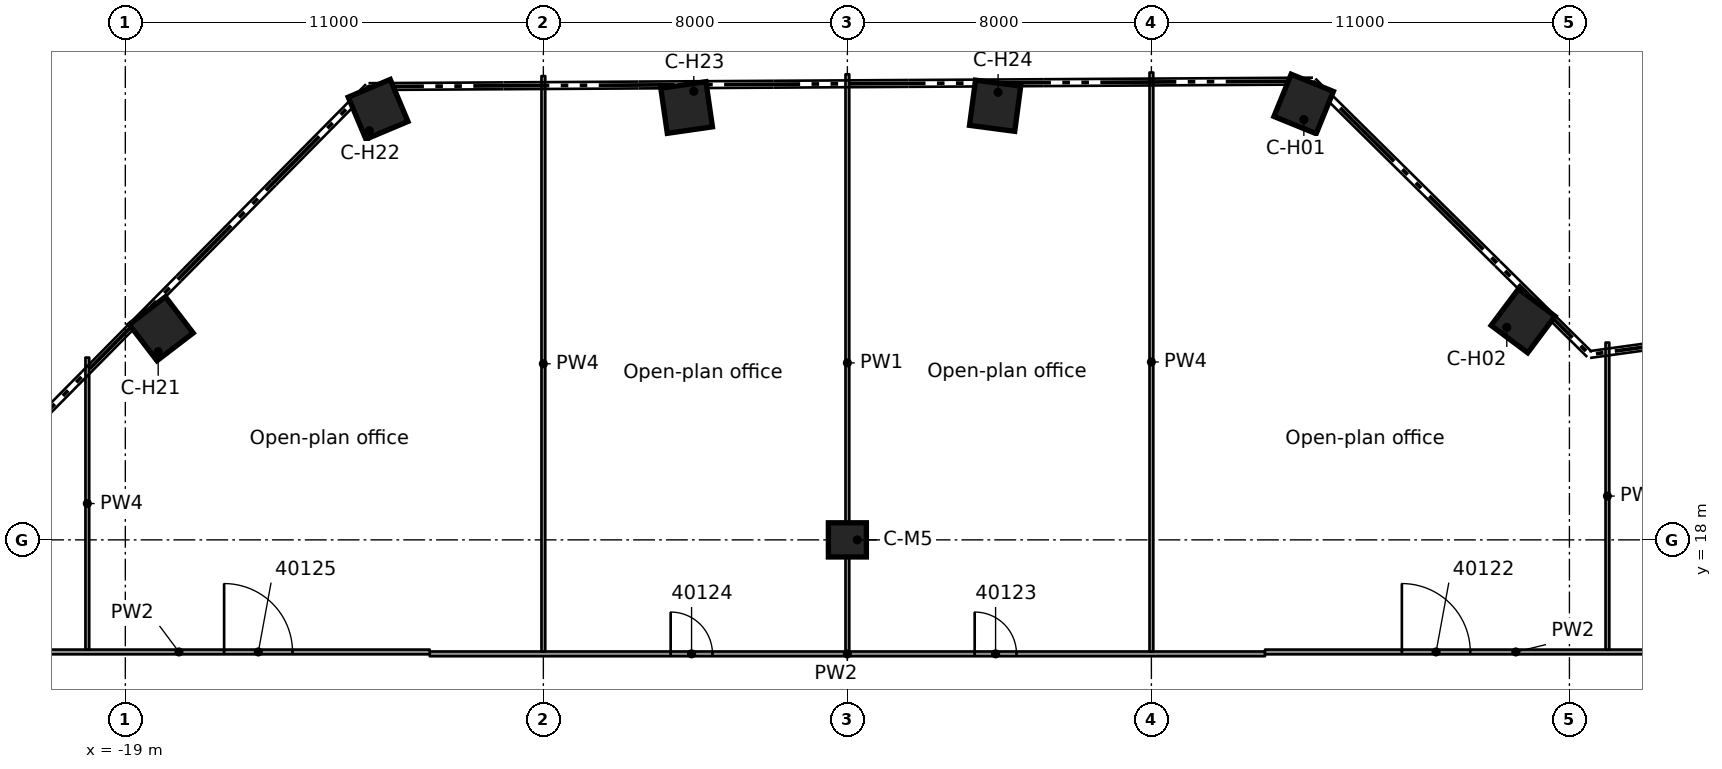
"""IFC4 building model, lengths in metres.
Left out: names, types, materials, properties, quantities, classifications, styles, units other than length and angle.
Written with IfcOpenShell. Run it as: python <this file> out.ifc"""

import sys

from ifc_helpers import new_model, si_unit, direction, frame, frame_2d, origin, origin_2d, place, context, subcontext, project, spatial, rectangle, extrude, element, fill, save


model = new_model("IFC4")
c1 = context("Model", 3, precision=1e-05, world=origin(), true_north=direction((0.0, 1.0)))
c2 = subcontext(c1, "Body", "Model", "MODEL_VIEW")
j1 = project(units=[si_unit("LENGTHUNIT", "METRE"), si_unit("PLANEANGLEUNIT", "RADIAN")], contexts=[c1])
p1 = place(None, origin())
s1 = spatial("IfcSite", under=j1, at=p1, CompositionType="ELEMENT")
p2 = place(p1, origin())
s2 = spatial("IfcBuilding", under=s1, at=p2, CompositionType="ELEMENT")
p3 = place(p2, frame((0.0, 0.0, 199.1)))
s3 = spatial("IfcBuildingStorey", under=s2, at=p3, CompositionType="ELEMENT", Elevation=199.1)
for number, where, z_axis, x_axis in (
    (1, (12.007, 29.47, 0.0), (0.0, 0.0, 1.0), (0.377, 0.926, 0.0)),
    (2, (17.781, 23.763, 0.0), (0.0, 0.0, 1.0), (0.599, 0.801, 0.0)),
    (3, (-18.056, 23.555, 0.0), (0.0, 0.0, 1.0), (-0.608, 0.794, 0.0)),
    (4, (-12.349, 29.329, 0.0), (0.0, 0.0, 1.0), (-0.388, 0.922, 0.0)),
    (5, (-4.23, 29.376, 0.0), (0.0, 0.0, 1.0), (-0.143, 0.99, 0.0)),
    (6, (3.888, 29.423, 0.0), (0.0, 0.0, 1.0), (0.131, 0.991, 0.0)),
):
    element("IfcColumn", number, at=place(p3, frame(where, z_axis=z_axis, x_axis=x_axis)), inside=s3, PredefinedType="COLUMN", context=c2, shape_type="SweptSolid", body=[
        extrude(rectangle(XDim=1.2, YDim=1.2, at=origin_2d()), origin(), (0.0, 0.0, 1.0), 3.5),
    ])
p4 = place(p3, frame((0.0, 18.0, 0.0), z_axis=(0.0, 0.0, 1.0), x_axis=(1.0, 0.0, 0.0)))
e7 = element("IfcColumn", 7, at=p4, inside=s3, PredefinedType="COLUMN", context=c2, shape_type="SweptSolid", body=[
    extrude(rectangle(XDim=1.0, YDim=0.9, at=origin_2d()), origin(), (0.0, 0.0, 1.0), 3.5),
])
p5 = place(p3, frame((-10.99, 15.001, 0.0), z_axis=(0.0, 0.0, 1.0), x_axis=(1.0, 0.0, 0.0)))
e8 = element("IfcWall", 8, at=p5, inside=s3, PredefinedType="PARTITIONING", context=c2, shape_type="SweptSolid", body=[
    extrude(rectangle(XDim=21.98, YDim=0.125, at=frame_2d((10.99, 0.0))), origin(), (0.0, 0.0, 1.0), 3.03),
])
p6 = place(p5, frame((14.34, 0.0, 0.0)))
e9 = element("IfcOpeningElement", 9, at=p6, cuts=e8, PredefinedType="OPENING", context=c2, shape_type="SweptSolid", body=[
    extrude(rectangle(XDim=1.1, YDim=2.1, at=frame_2d((0.55, 1.05))), frame((0.0, 0.073, 0.0), z_axis=(0.0, -1.0, 0.0), x_axis=(1.0, 0.0, 0.0)), (0.0, 0.0, 1.0), 0.145),
])
p7 = place(p5, frame((6.34, 0.0, 0.0)))
e10 = element("IfcOpeningElement", 10, at=p7, cuts=e8, PredefinedType="OPENING", context=c2, shape_type="SweptSolid", body=[
    extrude(rectangle(XDim=1.1, YDim=2.1, at=frame_2d((0.55, 1.05))), frame((0.0, 0.073, 0.0), z_axis=(0.0, -1.0, 0.0), x_axis=(1.0, 0.0, 0.0)), (0.0, 0.0, 1.0), 0.145),
])
p8 = place(p3, frame((-21.988, 15.051, 0.0), z_axis=(0.0, 0.0, 1.0), x_axis=(1.0, 0.0, 0.0)))
e11 = element("IfcWall", 11, at=p8, inside=s3, PredefinedType="PARTITIONING", context=c2, shape_type="SweptSolid", body=[
    extrude(rectangle(XDim=10.997, YDim=0.125, at=frame_2d((5.499, 0.0))), origin(), (0.0, 0.0, 1.0), 3.03),
])
p9 = place(p8, frame((5.587, 0.0, 0.0)))
e12 = element("IfcOpeningElement", 12, at=p9, cuts=e11, PredefinedType="OPENING", context=c2, shape_type="SweptSolid", body=[
    extrude(rectangle(XDim=1.8, YDim=2.1, at=frame_2d((0.9, 1.05))), frame((0.0, 0.073, 0.0), z_axis=(0.0, -1.0, 0.0), x_axis=(1.0, 0.0, 0.0)), (0.0, 0.0, 1.0), 0.145),
])
p10 = place(p3, frame((10.991, 15.051, 0.0), z_axis=(0.0, 0.0, 1.0), x_axis=(1.0, 0.0, 0.0)))
e13 = element("IfcWall", 13, at=p10, inside=s3, PredefinedType="PARTITIONING", context=c2, shape_type="SweptSolid", body=[
    extrude(rectangle(XDim=10.997, YDim=0.125, at=frame_2d((5.499, 0.0))), origin(), (0.0, 0.0, 1.0), 3.03),
])
p11 = place(p10, frame((3.6, 0.0, 0.0)))
e14 = element("IfcOpeningElement", 14, at=p11, cuts=e13, PredefinedType="OPENING", context=c2, shape_type="SweptSolid", body=[
    extrude(rectangle(XDim=1.8, YDim=2.1, at=frame_2d((0.9, 1.05))), frame((0.0, 0.073, 0.0), z_axis=(0.0, -1.0, 0.0), x_axis=(1.0, 0.0, 0.0)), (0.0, 0.0, 1.0), 0.145),
])
p12 = place(p3, frame((20.0, 15.114, 0.0), z_axis=(0.0, 0.0, 1.0), x_axis=(0.0, 1.0, 0.0)))
e15 = element("IfcWall", 15, at=p12, inside=s3, PredefinedType="PARTITIONING", context=c2, shape_type="SweptSolid", body=[
    extrude(rectangle(XDim=8.078, YDim=0.1, at=frame_2d((4.039, 0.0))), origin(), (0.0, 0.0, 1.0), 3.03),
])
p13 = place(p3, frame((8.0, 15.063, 0.0), z_axis=(0.0, 0.0, 1.0), x_axis=(0.0, 1.0, 0.0)))
e16 = element("IfcWall", 16, at=p13, inside=s3, PredefinedType="PARTITIONING", context=c2, shape_type="SweptSolid", body=[
    extrude(rectangle(XDim=15.234, YDim=0.1, at=frame_2d((7.617, 0.0))), origin(), (0.0, 0.0, 1.0), 2.395),
])
p14 = place(p3, frame((0.0, 15.063, 0.0), z_axis=(0.0, 0.0, 1.0), x_axis=(0.0, 1.0, 0.0)))
e17 = element("IfcWall", 17, at=p14, inside=s3, PredefinedType="PARTITIONING", context=c2, shape_type="SweptSolid", body=[
    extrude(rectangle(XDim=15.188, YDim=0.1, at=frame_2d((7.594, 0.0))), origin(), (0.0, 0.0, 1.0), 3.03),
])
p15 = place(p3, frame((-8.0, 15.063, 0.0), z_axis=(0.0, 0.0, 1.0), x_axis=(0.0, 1.0, 0.0)))
e18 = element("IfcWall", 18, at=p15, inside=s3, PredefinedType="PARTITIONING", context=c2, shape_type="SweptSolid", body=[
    extrude(rectangle(XDim=15.141, YDim=0.1, at=frame_2d((7.571, 0.0))), origin(), (0.0, 0.0, 1.0), 2.395),
])
p16 = place(p3, frame((-20.0, 15.114, 0.0), z_axis=(0.0, 0.0, 1.0), x_axis=(0.0, 1.0, 0.0)))
e19 = element("IfcWall", 19, at=p16, inside=s3, PredefinedType="PARTITIONING", context=c2, shape_type="SweptSolid", body=[
    extrude(rectangle(XDim=7.683, YDim=0.1, at=frame_2d((3.842, 0.0))), origin(), (0.0, 0.0, 1.0), 2.395),
])
p17 = place(p11, origin())
e20 = element("IfcDoor", 20, at=p17, inside=s3, OperationType="DOUBLE_DOOR_SINGLE_SWING", PredefinedType="DOOR", context=c2, shape_type="SweptSolid", body=[
    extrude(rectangle(XDim=1.8, YDim=2.1, at=frame_2d((0.9, 1.05))), frame((0.0, 0.025, 0.0), z_axis=(0.0, -1.0, 0.0), x_axis=(1.0, 0.0, 0.0)), (0.0, 0.0, 1.0), 0.05),
])
fill(e14, e20)
p18 = place(p6, origin())
e21 = element("IfcDoor", 21, at=p18, inside=s3, OperationType="SINGLE_SWING_RIGHT", PredefinedType="DOOR", context=c2, shape_type="SweptSolid", body=[
    extrude(rectangle(XDim=1.1, YDim=2.1, at=frame_2d((0.55, 1.05))), frame((0.0, 0.025, 0.0), z_axis=(0.0, -1.0, 0.0), x_axis=(1.0, 0.0, 0.0)), (0.0, 0.0, 1.0), 0.05),
])
fill(e9, e21)
p19 = place(p7, origin())
e22 = element("IfcDoor", 22, at=p19, inside=s3, OperationType="SINGLE_SWING_LEFT", PredefinedType="DOOR", context=c2, shape_type="SweptSolid", body=[
    extrude(rectangle(XDim=1.1, YDim=2.1, at=frame_2d((0.55, 1.05))), frame((0.0, 0.025, 0.0), z_axis=(0.0, -1.0, 0.0), x_axis=(1.0, 0.0, 0.0)), (0.0, 0.0, 1.0), 0.05),
])
fill(e10, e22)
p20 = place(p9, origin())
e23 = element("IfcDoor", 23, at=p20, inside=s3, OperationType="DOUBLE_DOOR_SINGLE_SWING", PredefinedType="DOOR", context=c2, shape_type="SweptSolid", body=[
    extrude(rectangle(XDim=1.8, YDim=2.1, at=frame_2d((0.9, 1.05))), frame((0.0, 0.025, 0.0), z_axis=(0.0, -1.0, 0.0), x_axis=(1.0, 0.0, 0.0)), (0.0, 0.0, 1.0), 0.05),
])
fill(e12, e23)
save(model, sys.argv[1])
